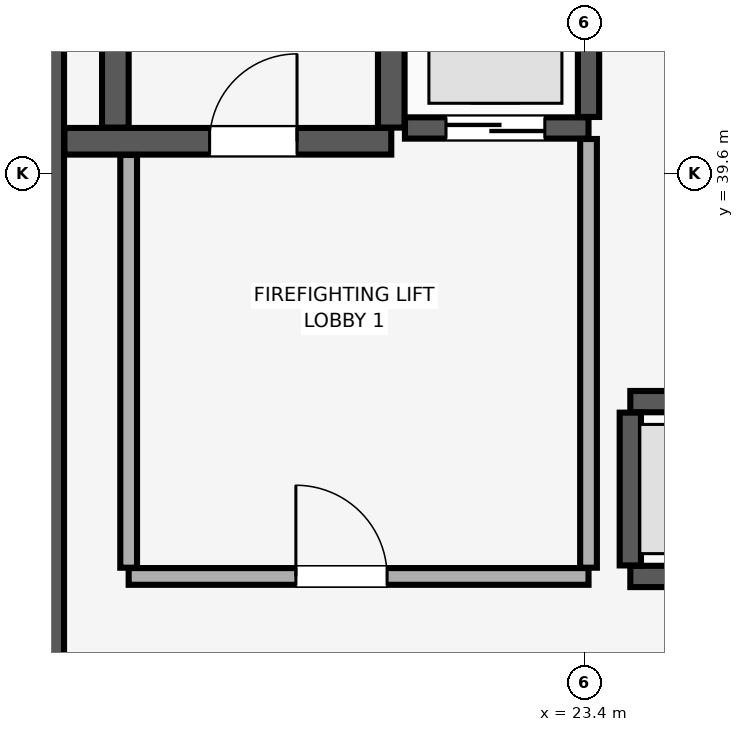
"""IFC4 building model, lengths in metres.
Left out: names, types, materials, properties, quantities, classifications, styles, units other than length and angle.
Written with IfcOpenShell. Run it as: python <this file> out.ifc"""

import sys

from ifc_helpers import new_model, si_unit, direction, frame, frame_2d, origin, place, context, subcontext, project, spatial, rectangle, extrude, element, fill, save


model = new_model("IFC4")
c1 = context("Model", 3, precision=1e-05, world=origin(), true_north=direction((0.0, 1.0)))
c2 = subcontext(c1, "Body", "Model", "MODEL_VIEW")
j1 = project(units=[si_unit("LENGTHUNIT", "METRE"), si_unit("PLANEANGLEUNIT", "RADIAN")], contexts=[c1])
p1 = place(None, origin())
s1 = spatial("IfcSite", under=j1, at=p1, CompositionType="ELEMENT")
p2 = place(p1, origin())
s2 = spatial("IfcBuilding", under=s1, at=p2, CompositionType="ELEMENT")
p3 = place(p2, frame((0.0, 0.0, 285.9)))
s3 = spatial("IfcBuildingStorey", under=s2, at=p3, CompositionType="ELEMENT", Elevation=285.9)
p4 = place(p3, frame((16.2, 29.4, 0.0), z_axis=(0.0, 0.0, 1.0), x_axis=(0.0, 1.0, 0.0)))
e1 = element("IfcWall", 1, at=p4, inside=s3, PredefinedType="SHEAR", context=c2, shape_type="SweptSolid", body=[
    extrude(rectangle(XDim=19.2, YDim=0.7, at=frame_2d((9.6, 0.0))), origin(), (0.0, 0.0, 1.0), 4.1),
])
p5 = place(p3, frame((16.555, 40.025, 0.0), z_axis=(0.0, 0.0, 1.0), x_axis=(1.0, 0.0, 0.0)))
e2 = element("IfcWall", 2, at=p5, inside=s3, PredefinedType="SHEAR", context=c2, shape_type="SweptSolid", body=[
    extrude(rectangle(XDim=4.3, YDim=0.35, at=frame_2d((2.15, 0.0))), origin(), (0.0, 0.0, 1.0), 4.1),
])
p6 = place(p5, frame((1.91, 0.0, 0.0)))
e3 = element("IfcOpeningElement", 3, at=p6, cuts=e2, PredefinedType="OPENING", context=c2, shape_type="SweptSolid", body=[
    extrude(rectangle(XDim=1.15, YDim=2.15, at=frame_2d((0.575, 1.075))), frame((0.0, 0.185, 0.0), z_axis=(0.0, -1.0, 0.0), x_axis=(1.0, 0.0, 0.0)), (0.0, 0.0, 1.0), 0.37),
])
for number, where, z_axis, x_axis in (
    (4, (17.225, 40.205, 0.0), (0.0, 0.0, 1.0), (0.0, 1.0, 0.0)),
    (5, (20.855, 40.205, 0.0), (0.0, 0.0, 1.0), (0.0, 1.0, 0.0)),
):
    element("IfcWall", number, at=place(p3, frame(where, z_axis=z_axis, x_axis=x_axis)), inside=s3, PredefinedType="SHEAR", context=c2, shape_type="SweptSolid", body=[
        extrude(rectangle(XDim=8.09, YDim=0.35, at=frame_2d((4.045, 0.0))), origin(), (0.0, 0.0, 1.0), 4.1),
    ])
p7 = place(p3, frame((24.0, 34.3, 0.0), z_axis=(0.0, 0.0, 1.0), x_axis=(1.0, 0.0, 0.0)))
e6 = element("IfcWall", 6, at=p7, inside=s3, PredefinedType="SHEAR", context=c2, shape_type="SweptSolid", body=[
    extrude(rectangle(XDim=2.3, YDim=0.28, at=frame_2d((1.15, 0.0))), origin(), (0.0, 0.0, 1.0), 4.1),
])
p8 = place(p7, frame((0.6, 0.0, 0.0)))
e7 = element("IfcOpeningElement", 7, at=p8, cuts=e6, PredefinedType="OPENING", context=c2, shape_type="SweptSolid", body=[
    extrude(rectangle(XDim=1.1, YDim=2.2, at=frame_2d((0.55, 1.1))), frame((0.0, 0.15, 0.0), z_axis=(0.0, -1.0, 0.0), x_axis=(1.0, 0.0, 0.0)), (0.0, 0.0, 1.0), 0.3),
])
p9 = place(p3, frame((24.0, 36.6, 0.0), z_axis=(0.0, 0.0, 1.0), x_axis=(1.0, 0.0, 0.0)))
e8 = element("IfcWall", 8, at=p9, inside=s3, PredefinedType="SHEAR", context=c2, shape_type="SweptSolid", body=[
    extrude(rectangle(XDim=2.3, YDim=0.28, at=frame_2d((1.15, 0.0))), origin(), (0.0, 0.0, 1.0), 4.1),
])
p10 = place(p3, frame((24.0, 34.445, 0.0), z_axis=(0.0, 0.0, 1.0), x_axis=(0.0, 1.0, 0.0)))
e9 = element("IfcWall", 9, at=p10, inside=s3, PredefinedType="SHEAR", context=c2, shape_type="SweptSolid", body=[
    extrude(rectangle(XDim=2.01, YDim=0.28, at=frame_2d((1.005, 0.0))), origin(), (0.0, 0.0, 1.0), 4.1),
])
p11 = place(p3, frame((21.035, 40.2, 0.0), z_axis=(0.0, 0.0, 1.0), x_axis=(1.0, 0.0, 0.0)))
e10 = element("IfcWall", 10, at=p11, inside=s3, PredefinedType="SHEAR", context=c2, shape_type="SweptSolid", body=[
    extrude(rectangle(XDim=2.415, YDim=0.28, at=frame_2d((1.208, 0.0))), origin(), (0.0, 0.0, 1.0), 4.1),
])
p12 = place(p11, frame((0.54, 0.0, 0.0)))
e11 = element("IfcOpeningElement", 11, at=p12, cuts=e10, PredefinedType="OPENING", context=c2, shape_type="SweptSolid", body=[
    extrude(rectangle(XDim=1.3, YDim=2.3, at=frame_2d((0.65, 1.15))), frame((0.0, 0.15, 0.0), z_axis=(0.0, -1.0, 0.0), x_axis=(1.0, 0.0, 0.0)), (0.0, 0.0, 1.0), 0.3),
])
p13 = place(p3, frame((23.45, 40.345, 0.0), z_axis=(0.0, 0.0, 1.0), x_axis=(0.0, 1.0, 0.0)))
e12 = element("IfcWall", 12, at=p13, inside=s3, PredefinedType="SHEAR", context=c2, shape_type="SweptSolid", body=[
    extrude(rectangle(XDim=2.81, YDim=0.28, at=frame_2d((1.405, 0.0))), origin(), (0.0, 0.0, 1.0), 4.1),
])
p14 = place(p3, frame((17.4, 34.3, 0.0), z_axis=(0.0, 0.0, 1.0), x_axis=(1.0, 0.0, 0.0)))
e13 = element("IfcWall", 13, at=p14, inside=s3, PredefinedType="PARTITIONING", context=c2, shape_type="SweptSolid", body=[
    extrude(rectangle(XDim=6.05, YDim=0.22, at=frame_2d((3.025, 0.0))), origin(), (0.0, 0.0, 1.0), 4.1),
])
p15 = place(p14, frame((2.2, 0.0, 0.0)))
e14 = element("IfcOpeningElement", 14, at=p15, cuts=e13, PredefinedType="OPENING", context=c2, shape_type="SweptSolid", body=[
    extrude(rectangle(XDim=1.2, YDim=2.15, at=frame_2d((0.6, 1.075))), frame((0.0, 0.12, 0.0), z_axis=(0.0, -1.0, 0.0), x_axis=(1.0, 0.0, 0.0)), (0.0, 0.0, 1.0), 0.24),
])
p16 = place(p3, frame((17.4, 34.415, 0.0), z_axis=(0.0, 0.0, 1.0), x_axis=(0.0, 1.0, 0.0)))
e15 = element("IfcWall", 15, at=p16, inside=s3, PredefinedType="PARTITIONING", context=c2, shape_type="SweptSolid", body=[
    extrude(rectangle(XDim=5.43, YDim=0.22, at=frame_2d((2.715, 0.0))), origin(), (0.0, 0.0, 1.0), 4.1),
])
p17 = place(p3, frame((23.45, 34.415, 0.0), z_axis=(0.0, 0.0, 1.0), x_axis=(0.0, 1.0, 0.0)))
e16 = element("IfcWall", 16, at=p17, inside=s3, PredefinedType="PARTITIONING", context=c2, shape_type="SweptSolid", body=[
    extrude(rectangle(XDim=5.64, YDim=0.22, at=frame_2d((2.82, 0.0))), origin(), (0.0, 0.0, 1.0), 4.1),
])
p18 = place(p6, origin())
e17 = element("IfcDoor", 17, at=p18, inside=s3, OperationType="SINGLE_SWING_RIGHT", PredefinedType="DOOR", context=c2, shape_type="SweptSolid", body=[
    extrude(rectangle(XDim=1.15, YDim=2.15, at=frame_2d((0.575, 1.075))), frame((0.0, 0.025, 0.0), z_axis=(0.0, -1.0, 0.0), x_axis=(1.0, 0.0, 0.0)), (0.0, 0.0, 1.0), 0.05),
])
fill(e3, e17)
p19 = place(p12, origin())
e18 = element("IfcDoor", 18, at=p19, inside=s3, OperationType="DOUBLE_DOOR_SLIDING", PredefinedType="DOOR", context=c2, shape_type="SweptSolid", body=[
    extrude(rectangle(XDim=1.3, YDim=2.3, at=frame_2d((0.65, 1.15))), frame((0.0, 0.025, 0.0), z_axis=(0.0, -1.0, 0.0), x_axis=(1.0, 0.0, 0.0)), (0.0, 0.0, 1.0), 0.05),
])
fill(e11, e18)
p20 = place(p15, origin())
e19 = element("IfcDoor", 19, at=p20, inside=s3, OperationType="SINGLE_SWING_LEFT", PredefinedType="DOOR", context=c2, shape_type="SweptSolid", body=[
    extrude(rectangle(XDim=1.2, YDim=2.15, at=frame_2d((0.6, 1.075))), frame((0.0, 0.025, 0.0), z_axis=(0.0, -1.0, 0.0), x_axis=(1.0, 0.0, 0.0)), (0.0, 0.0, 1.0), 0.05),
])
fill(e14, e19)
save(model, sys.argv[1])
